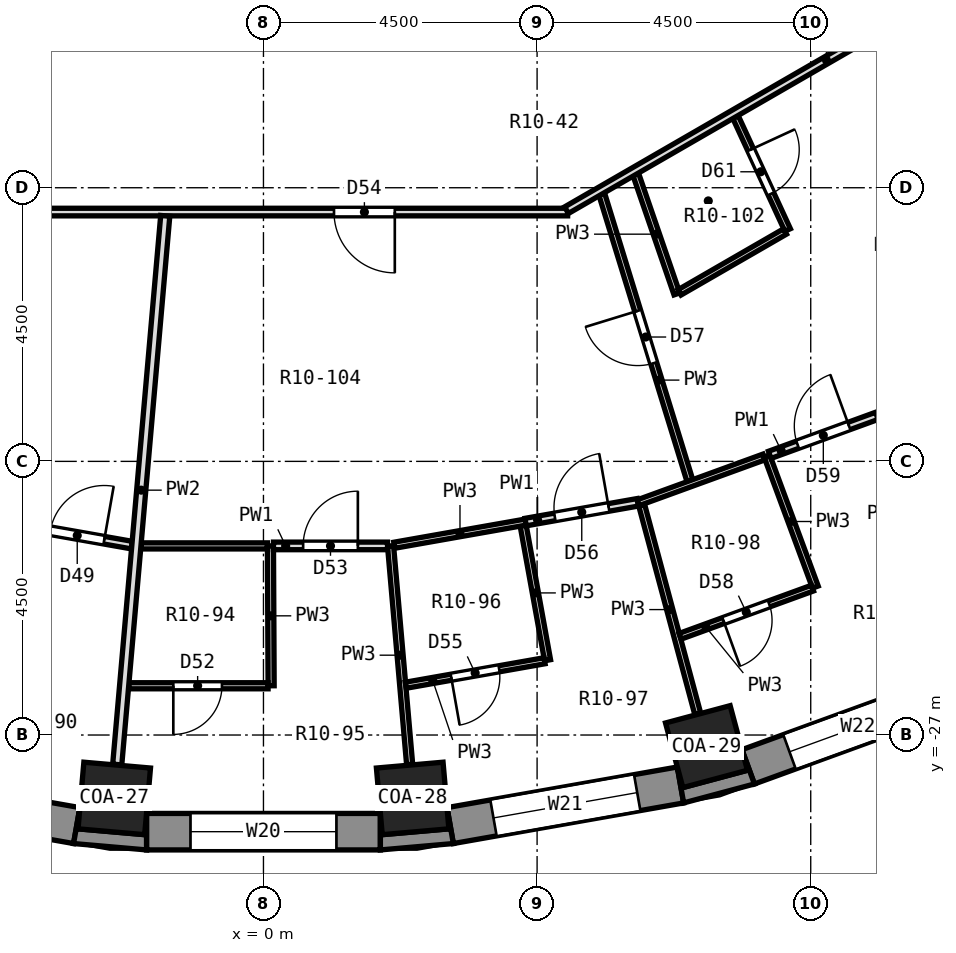
"""IFC4 building model, lengths in metres.
Left out: names, types, materials, properties, quantities, classifications, styles, units other than length and angle.
Written with IfcOpenShell. Run it as: python <this file> out.ifc"""

import sys

from ifc_helpers import new_model, si_unit, direction, frame, frame_2d, origin, origin_2d, place, context, subcontext, project, spatial, polyline, rectangle, outline, extrude, element, fill, save


model = new_model("IFC4")
c1 = context("Model", 3, precision=1e-05, world=origin(), true_north=direction((0.0, 1.0)))
c2 = subcontext(c1, "Body", "Model", "MODEL_VIEW")
j1 = project(units=[si_unit("LENGTHUNIT", "METRE"), si_unit("PLANEANGLEUNIT", "RADIAN")], contexts=[c1])
p1 = place(None, origin())
s1 = spatial("IfcSite", under=j1, at=p1, CompositionType="ELEMENT")
p2 = place(p1, origin())
s2 = spatial("IfcBuilding", under=s1, at=p2, CompositionType="ELEMENT")
p3 = place(p2, frame((0.0, 0.0, 36.2)))
s3 = spatial("IfcBuildingStorey", under=s2, at=p3, CompositionType="ELEMENT", Elevation=36.2)
for number, where, z_axis, x_axis in (
    (1, (-2.453, -28.043, 0.0), (0.0, 0.0, 1.0), (-0.087, -0.996, 0.0)),
    (2, (2.453, -28.043, 0.0), (0.0, 0.0, 1.0), (0.087, -0.996, 0.0)),
    (3, (7.286, -27.191, 0.0), (0.0, 0.0, 1.0), (0.259, -0.966, 0.0)),
):
    element("IfcColumn", number, at=place(p3, frame(where, z_axis=z_axis, x_axis=x_axis)), inside=s3, PredefinedType="COLUMN", context=c2, shape_type="SweptSolid", body=[
        extrude(rectangle(XDim=1.1, YDim=1.1, at=origin_2d()), origin(), (0.0, 0.0, 1.0), 3.3),
    ])
p4 = place(p3, frame((-6.858, -27.821, 0.0), z_axis=(0.0, 0.0, 1.0), x_axis=(0.984800809218, -0.173687553279, 0.0)))
e4 = element("IfcWall", 4, at=p4, inside=s3, PredefinedType="SOLIDWALL", context=c2, shape_type="SweptSolid", body=[
    extrude(rectangle(XDim=3.846, YDim=0.6, at=frame_2d((1.923, 0.0))), origin(), (0.0, 0.0, 1.0), 2.75),
])
p5 = place(p4, frame((0.723, 0.0, 0.9)))
e5 = element("IfcOpeningElement", 5, at=p5, cuts=e4, PredefinedType="OPENING", context=c2, shape_type="SweptSolid", body=[
    extrude(rectangle(XDim=2.4, YDim=1.8, at=frame_2d((1.2, 0.9))), frame((0.0, 0.312, 0.0), z_axis=(0.0, -1.0, 0.0), x_axis=(1.0, 0.0, 0.0)), (0.0, 0.0, 1.0), 0.624),
])
p6 = place(p3, frame((-1.923, -28.59, 0.0), z_axis=(0.0, 0.0, 1.0), x_axis=(1.0, 0.0, 0.0)))
e6 = element("IfcWall", 6, at=p6, inside=s3, PredefinedType="SOLIDWALL", context=c2, shape_type="SweptSolid", body=[
    extrude(rectangle(XDim=3.846, YDim=0.6, at=frame_2d((1.923, 0.0))), origin(), (0.0, 0.0, 1.0), 2.75),
])
p7 = place(p6, frame((0.723, 0.0, 0.9)))
e7 = element("IfcOpeningElement", 7, at=p7, cuts=e6, PredefinedType="OPENING", context=c2, shape_type="SweptSolid", body=[
    extrude(rectangle(XDim=2.4, YDim=1.8, at=frame_2d((1.2, 0.9))), frame((0.0, 0.312, 0.0), z_axis=(0.0, -1.0, 0.0), x_axis=(1.0, 0.0, 0.0)), (0.0, 0.0, 1.0), 0.624),
])
p8 = place(p3, frame((3.071, -28.489, 0.0), z_axis=(0.0, 0.0, 1.0), x_axis=(0.984800809218, 0.173687553279, 0.0)))
e8 = element("IfcWall", 8, at=p8, inside=s3, PredefinedType="SOLIDWALL", context=c2, shape_type="SweptSolid", body=[
    extrude(rectangle(XDim=3.846, YDim=0.6, at=frame_2d((1.923, 0.0))), origin(), (0.0, 0.0, 1.0), 2.75),
])
p9 = place(p8, frame((0.723, 0.0, 0.9)))
e9 = element("IfcOpeningElement", 9, at=p9, cuts=e8, PredefinedType="OPENING", context=c2, shape_type="SweptSolid", body=[
    extrude(rectangle(XDim=2.4, YDim=1.8, at=frame_2d((1.2, 0.9))), frame((0.0, 0.312, 0.0), z_axis=(0.0, -1.0, 0.0), x_axis=(1.0, 0.0, 0.0)), (0.0, 0.0, 1.0), 0.624),
])
p10 = place(p3, frame((7.971, -27.523, 0.0), z_axis=(0.0, 0.0, 1.0), x_axis=(0.939689588564, 0.342028474173, 0.0)))
e10 = element("IfcWall", 10, at=p10, inside=s3, PredefinedType="SOLIDWALL", context=c2, shape_type="SweptSolid", body=[
    extrude(rectangle(XDim=3.846, YDim=0.6, at=frame_2d((1.923, 0.0))), origin(), (0.0, 0.0, 1.0), 2.75),
])
p11 = place(p10, frame((0.723, 0.0, 0.9)))
e11 = element("IfcOpeningElement", 11, at=p11, cuts=e10, PredefinedType="OPENING", context=c2, shape_type="SweptSolid", body=[
    extrude(rectangle(XDim=2.4, YDim=1.8, at=frame_2d((1.2, 0.9))), frame((0.0, 0.312, 0.0), z_axis=(0.0, -1.0, 0.0), x_axis=(1.0, 0.0, 0.0)), (0.0, 0.0, 1.0), 0.624),
])
p12 = place(p3, origin())
e12 = element("IfcWall", 12, at=p12, inside=s3, PredefinedType="SOLIDWALL", context=c2, shape_type="SweptSolid", body=[
    extrude(outline(polyline([(-3.123, -28.785), (-1.923, -28.89), (-1.923, -28.29), (-1.954, -28.639), (-3.049, -28.543), (-3.019, -28.194), (-3.123, -28.785)])), origin(), (0.0, 0.0, 1.0), 2.75),
])
p13 = place(p3, origin())
e13 = element("IfcWall", 13, at=p13, inside=s3, PredefinedType="SOLIDWALL", context=c2, shape_type="SweptSolid", body=[
    extrude(outline(polyline([(1.923, -28.89), (3.123, -28.785), (3.019, -28.194), (3.049, -28.543), (1.954, -28.639), (1.923, -28.29), (1.923, -28.89)])), origin(), (0.0, 0.0, 1.0), 2.75),
])
p14 = place(p3, origin())
e14 = element("IfcWall", 14, at=p14, inside=s3, PredefinedType="SOLIDWALL", context=c2, shape_type="SweptSolid", body=[
    extrude(outline(polyline([(6.91, -28.117), (8.074, -27.805), (7.869, -27.241), (7.959, -27.58), (6.897, -27.865), (6.806, -27.526), (6.91, -28.117)])), origin(), (0.0, 0.0, 1.0), 2.75),
])
p15 = place(p3, frame((0.115, -23.89, 0.0), z_axis=(0.0, 0.0, 1.0), x_axis=(0.004776508509, -0.999988592418, 0.0)))
e15 = element("IfcWall", 15, at=p15, inside=s3, PredefinedType="PARTITIONING", context=c2, shape_type="SweptSolid", body=[
    extrude(rectangle(XDim=2.3, YDim=0.1, at=frame_2d((1.15, 0.0))), origin(), (0.0, 0.0, 1.0), 2.75),
])
p16 = place(p3, frame((2.09, -23.89, 0.0), z_axis=(0.0, 0.0, 1.0), x_axis=(0.08706456859, -0.996202670593, 0.0)))
e16 = element("IfcWall", 16, at=p16, inside=s3, PredefinedType="PARTITIONING", context=c2, shape_type="SweptSolid", body=[
    extrude(rectangle(XDim=3.609, YDim=0.1, at=frame_2d((1.804, 0.0))), origin(), (0.0, 0.0, 1.0), 2.75),
])
p17 = place(p3, frame((4.271, -23.556, 0.0), z_axis=(0.0, 0.0, 1.0), x_axis=(0.178283818946, -0.983979105419, 0.0)))
e17 = element("IfcWall", 17, at=p17, inside=s3, PredefinedType="PARTITIONING", context=c2, shape_type="SweptSolid", body=[
    extrude(rectangle(XDim=2.25, YDim=0.1, at=frame_2d((1.125, 0.0))), origin(), (0.0, 0.0, 1.0), 2.75),
])
p18 = place(p3, frame((6.221, -23.225, 0.0), z_axis=(0.0, 0.0, 1.0), x_axis=(0.259393262225, -0.965771782313, 0.0)))
e18 = element("IfcWall", 18, at=p18, inside=s3, PredefinedType="PARTITIONING", context=c2, shape_type="SweptSolid", body=[
    extrude(rectangle(XDim=3.546, YDim=0.1, at=frame_2d((1.773, 0.0))), origin(), (0.0, 0.0, 1.0), 2.75),
])
p19 = place(p3, frame((5.563, -18.105, 0.0), z_axis=(0.0, 0.0, 1.0), x_axis=(0.293856171107, -0.955849648586, 0.0)))
e19 = element("IfcWall", 19, at=p19, inside=s3, PredefinedType="PARTITIONING", context=c2, shape_type="SweptSolid", body=[
    extrude(rectangle(XDim=4.93, YDim=0.1, at=frame_2d((2.465, 0.0))), origin(), (0.0, 0.0, 1.0), 2.75),
])
p20 = place(p19, frame((2.009, 0.0, 0.0)))
e20 = element("IfcOpeningElement", 20, at=p20, cuts=e19, PredefinedType="OPENING", context=c2, shape_type="SweptSolid", body=[
    extrude(rectangle(XDim=0.9, YDim=2.1, at=frame_2d((0.45, 1.05))), frame((0.0, 0.062, 0.0), z_axis=(0.0, -1.0, 0.0), x_axis=(1.0, 0.0, 0.0)), (0.0, 0.0, 1.0), 0.124),
])
p21 = place(p3, frame((6.123, -17.782, 0.0), z_axis=(0.0, 0.0, 1.0), x_axis=(0.325345833464, -0.945595097622, 0.0)))
e21 = element("IfcWall", 21, at=p21, inside=s3, PredefinedType="PARTITIONING", context=c2, shape_type="SweptSolid", body=[
    extrude(rectangle(XDim=2.077, YDim=0.1, at=frame_2d((1.039, 0.0))), origin(), (0.0, 0.0, 1.0), 2.75),
])
p22 = place(p3, frame((8.279, -22.41, 0.0), z_axis=(0.0, 0.0, 1.0), x_axis=(0.346546571046, -0.938032768136, 0.0)))
e22 = element("IfcWall", 22, at=p22, inside=s3, PredefinedType="PARTITIONING", context=c2, shape_type="SweptSolid", body=[
    extrude(rectangle(XDim=2.3, YDim=0.1, at=frame_2d((1.15, 0.0))), origin(), (0.0, 0.0, 1.0), 2.75),
])
p23 = place(p3, frame((7.763, -16.837, 0.0), z_axis=(0.0, 0.0, 1.0), x_axis=(0.418740408402, -0.908105979702, 0.0)))
e23 = element("IfcWall", 23, at=p23, inside=s3, PredefinedType="PARTITIONING", context=c2, shape_type="SweptSolid", body=[
    extrude(rectangle(XDim=2.046, YDim=0.1, at=frame_2d((1.023, 0.0))), origin(), (0.0, 0.0, 1.0), 2.75),
])
p24 = place(p23, frame((0.592, 0.0, 0.0)))
e24 = element("IfcOpeningElement", 24, at=p24, cuts=e23, PredefinedType="OPENING", context=c2, shape_type="SweptSolid", body=[
    extrude(rectangle(XDim=0.8, YDim=2.1, at=frame_2d((0.4, 1.05))), frame((0.0, 0.062, 0.0), z_axis=(0.0, -1.0, 0.0), x_axis=(1.0, 0.0, 0.0)), (0.0, 0.0, 1.0), 0.124),
])
p25 = place(p3, frame((-3.986, -23.556, 0.0), z_axis=(0.0, 0.0, 1.0), x_axis=(0.984806134001, -0.173657359285, 0.0)))
e25 = element("IfcWall", 25, at=p25, inside=s3, PredefinedType="PARTITIONING", context=c2, shape_type="SweptSolid", body=[
    extrude(rectangle(XDim=1.85, YDim=0.125, at=frame_2d((0.925, 0.0))), origin(), (0.0, 0.0, 1.0), 2.75),
])
p26 = place(p25, frame((0.488, 0.0, 0.0)))
e26 = element("IfcOpeningElement", 26, at=p26, cuts=e25, PredefinedType="OPENING", context=c2, shape_type="SweptSolid", body=[
    extrude(rectangle(XDim=0.9, YDim=2.1, at=frame_2d((0.45, 1.05))), frame((0.0, 0.074, 0.0), z_axis=(0.0, -1.0, 0.0), x_axis=(1.0, 0.0, 0.0)), (0.0, 0.0, 1.0), 0.149),
])
p27 = place(p3, frame((-2.216, -26.19, 0.0), z_axis=(0.0, 0.0, 1.0), x_axis=(1.0, 0.0, 0.0)))
e27 = element("IfcWall", 27, at=p27, inside=s3, PredefinedType="PARTITIONING", context=c2, shape_type="SweptSolid", body=[
    extrude(rectangle(XDim=2.292, YDim=0.1, at=frame_2d((1.146, 0.0))), origin(), (0.0, 0.0, 1.0), 2.75),
])
p28 = place(p27, frame((0.733, 0.0, 0.0)))
e28 = element("IfcOpeningElement", 28, at=p28, cuts=e27, PredefinedType="OPENING", context=c2, shape_type="SweptSolid", body=[
    extrude(rectangle(XDim=0.8, YDim=2.1, at=frame_2d((0.4, 1.05))), frame((0.0, 0.062, 0.0), z_axis=(0.0, -1.0, 0.0), x_axis=(1.0, 0.0, 0.0)), (0.0, 0.0, 1.0), 0.124),
])
p29 = place(p3, frame((-2.015, -23.89, 0.0), z_axis=(0.0, 0.0, 1.0), x_axis=(1.0, 0.0, 0.0)))
e29 = element("IfcWall", 29, at=p29, inside=s3, PredefinedType="PARTITIONING", context=c2, shape_type="SweptSolid", body=[
    extrude(rectangle(XDim=2.08, YDim=0.1, at=frame_2d((1.04, 0.0))), origin(), (0.0, 0.0, 1.0), 2.75),
])
p30 = place(p3, frame((0.165, -23.89, 0.0), z_axis=(0.0, 0.0, 1.0), x_axis=(1.0, 0.0, 0.0)))
e30 = element("IfcWall", 30, at=p30, inside=s3, PredefinedType="PARTITIONING", context=c2, shape_type="SweptSolid", body=[
    extrude(rectangle(XDim=1.875, YDim=0.125, at=frame_2d((0.938, 0.0))), origin(), (0.0, 0.0, 1.0), 2.75),
])
p31 = place(p30, frame((0.488, 0.0, 0.0)))
e31 = element("IfcOpeningElement", 31, at=p31, cuts=e30, PredefinedType="OPENING", context=c2, shape_type="SweptSolid", body=[
    extrude(rectangle(XDim=0.9, YDim=2.1, at=frame_2d((0.45, 1.05))), frame((0.0, 0.074, 0.0), z_axis=(0.0, -1.0, 0.0), x_axis=(1.0, 0.0, 0.0)), (0.0, 0.0, 1.0), 0.149),
])
p32 = place(p3, frame((-4.867, -18.4, 0.0), z_axis=(0.0, 0.0, 1.0), x_axis=(1.0, 0.0, 0.0)))
e32 = element("IfcWall", 32, at=p32, inside=s3, PredefinedType="PARTITIONING", context=c2, shape_type="SweptSolid", body=[
    extrude(rectangle(XDim=9.87, YDim=0.125, at=frame_2d((4.935, 0.0))), origin(), (0.0, 0.0, 1.0), 2.75),
])
p33 = place(p32, frame((6.028, 0.0, 0.0)))
e33 = element("IfcOpeningElement", 33, at=p33, cuts=e32, PredefinedType="OPENING", context=c2, shape_type="SweptSolid", body=[
    extrude(rectangle(XDim=1.0, YDim=2.1, at=frame_2d((0.5, 1.05))), frame((0.0, 0.074, 0.0), z_axis=(0.0, -1.0, 0.0), x_axis=(1.0, 0.0, 0.0)), (0.0, 0.0, 1.0), 0.149),
])
p34 = place(p3, frame((2.341, -26.181, 0.0), z_axis=(0.0, 0.0, 1.0), x_axis=(0.984795222678, 0.173719225738, 0.0)))
e34 = element("IfcWall", 34, at=p34, inside=s3, PredefinedType="PARTITIONING", context=c2, shape_type="SweptSolid", body=[
    extrude(rectangle(XDim=2.317, YDim=0.1, at=frame_2d((1.159, 0.0))), origin(), (0.0, 0.0, 1.0), 2.75),
])
p35 = place(p34, frame((0.759, 0.0, 0.0)))
e35 = element("IfcOpeningElement", 35, at=p35, cuts=e34, PredefinedType="OPENING", context=c2, shape_type="SweptSolid", body=[
    extrude(rectangle(XDim=0.8, YDim=2.1, at=frame_2d((0.4, 1.05))), frame((0.0, 0.062, 0.0), z_axis=(0.0, -1.0, 0.0), x_axis=(1.0, 0.0, 0.0)), (0.0, 0.0, 1.0), 0.124),
])
p36 = place(p3, frame((2.152, -23.879, 0.0), z_axis=(0.0, 0.0, 1.0), x_axis=(0.984803725636, 0.173671016504, 0.0)))
e36 = element("IfcWall", 36, at=p36, inside=s3, PredefinedType="PARTITIONING", context=c2, shape_type="SweptSolid", body=[
    extrude(rectangle(XDim=2.193, YDim=0.1, at=frame_2d((1.097, 0.0))), origin(), (0.0, 0.0, 1.0), 2.75),
])
p37 = place(p3, frame((4.311, -23.498, 0.0), z_axis=(0.0, 0.0, 1.0), x_axis=(0.984797974945, 0.173703622713, 0.0)))
e37 = element("IfcWall", 37, at=p37, inside=s3, PredefinedType="PARTITIONING", context=c2, shape_type="SweptSolid", body=[
    extrude(rectangle(XDim=1.875, YDim=0.125, at=frame_2d((0.938, 0.0))), origin(), (0.0, 0.0, 1.0), 2.75),
])
p38 = place(p37, frame((0.488, 0.0, 0.0)))
e38 = element("IfcOpeningElement", 38, at=p38, cuts=e37, PredefinedType="OPENING", context=c2, shape_type="SweptSolid", body=[
    extrude(rectangle(XDim=0.9, YDim=2.1, at=frame_2d((0.45, 1.05))), frame((0.0, 0.074, 0.0), z_axis=(0.0, -1.0, 0.0), x_axis=(1.0, 0.0, 0.0)), (0.0, 0.0, 1.0), 0.149),
])
p39 = place(p3, frame((6.851, -25.377, 0.0), z_axis=(0.0, 0.0, 1.0), x_axis=(0.939679567759, 0.342056004093, 0.0)))
e39 = element("IfcWall", 39, at=p39, inside=s3, PredefinedType="PARTITIONING", context=c2, shape_type="SweptSolid", body=[
    extrude(rectangle(XDim=2.318, YDim=0.1, at=frame_2d((1.159, 0.0))), origin(), (0.0, 0.0, 1.0), 2.75),
])
p40 = place(p39, frame((0.758, 0.0, 0.0)))
e40 = element("IfcOpeningElement", 40, at=p40, cuts=e39, PredefinedType="OPENING", context=c2, shape_type="SweptSolid", body=[
    extrude(rectangle(XDim=0.8, YDim=2.1, at=frame_2d((0.4, 1.05))), frame((0.0, 0.062, 0.0), z_axis=(0.0, -1.0, 0.0), x_axis=(1.0, 0.0, 0.0)), (0.0, 0.0, 1.0), 0.124),
])
p41 = place(p3, frame((6.159, -23.181, 0.0), z_axis=(0.0, 0.0, 1.0), x_axis=(0.939696437289, 0.342009657388, 0.0)))
e41 = element("IfcWall", 41, at=p41, inside=s3, PredefinedType="PARTITIONING", context=c2, shape_type="SweptSolid", body=[
    extrude(rectangle(XDim=2.206, YDim=0.1, at=frame_2d((1.103, 0.0))), origin(), (0.0, 0.0, 1.0), 2.75),
])
p42 = place(p3, frame((8.326, -22.393, 0.0), z_axis=(0.0, 0.0, 1.0), x_axis=(0.939656514106, 0.342119329325, 0.0)))
e42 = element("IfcWall", 42, at=p42, inside=s3, PredefinedType="PARTITIONING", context=c2, shape_type="SweptSolid", body=[
    extrude(rectangle(XDim=1.875, YDim=0.125, at=frame_2d((0.938, 0.0))), origin(), (0.0, 0.0, 1.0), 2.75),
])
p43 = place(p42, frame((0.488, 0.0, 0.0)))
e43 = element("IfcOpeningElement", 43, at=p43, cuts=e42, PredefinedType="OPENING", context=c2, shape_type="SweptSolid", body=[
    extrude(rectangle(XDim=0.9, YDim=2.1, at=frame_2d((0.45, 1.05))), frame((0.0, 0.074, 0.0), z_axis=(0.0, -1.0, 0.0), x_axis=(1.0, 0.0, 0.0)), (0.0, 0.0, 1.0), 0.149),
])
p44 = place(p3, frame((6.842, -19.721, 0.0), z_axis=(0.0, 0.0, 1.0), x_axis=(0.866104386261, 0.499863173377, 0.0)))
e44 = element("IfcWall", 44, at=p44, inside=s3, PredefinedType="PARTITIONING", context=c2, shape_type="SweptSolid", body=[
    extrude(rectangle(XDim=2.002, YDim=0.1, at=frame_2d((1.001, 0.0))), origin(), (0.0, 0.0, 1.0), 2.75),
])
p45 = place(p3, frame((4.984, -18.369, 0.0), z_axis=(0.0, 0.0, 1.0), x_axis=(0.86605048973, 0.49995654735, 0.0)))
e45 = element("IfcWall", 45, at=p45, inside=s3, PredefinedType="PARTITIONING", context=c2, shape_type="SweptSolid", body=[
    extrude(rectangle(XDim=9.871, YDim=0.125, at=frame_2d((4.935, 0.0))), origin(), (0.0, 0.0, 1.0), 2.75),
])
p46 = place(p45, frame((7.174, 0.0, 0.0)))
e46 = element("IfcOpeningElement", 46, at=p46, cuts=e45, PredefinedType="OPENING", context=c2, shape_type="SweptSolid", body=[
    extrude(rectangle(XDim=1.0, YDim=2.1, at=frame_2d((0.5, 1.05))), frame((0.0, 0.074, 0.0), z_axis=(0.0, -1.0, 0.0), x_axis=(1.0, 0.0, 0.0)), (0.0, 0.0, 1.0), 0.149),
])
p47 = place(p3, frame((-2.405, -27.485, 0.0), z_axis=(0.0, 0.0, 1.0), x_axis=(0.087173972326, 0.996193103042, 0.0)))
e47 = element("IfcWall", 47, at=p47, inside=s3, PredefinedType="PARTITIONING", context=c2, shape_type="SweptSolid", body=[
    extrude(rectangle(XDim=9.057, YDim=0.15, at=frame_2d((4.529, 0.0))), origin(), (0.0, 0.0, 1.0), 2.75),
])
p48 = place(p7, origin())
e48 = element("IfcWindow", 48, at=p48, inside=s3, PartitioningType="SINGLE_PANEL", PredefinedType="WINDOW", context=c2, shape_type="SweptSolid", body=[
    extrude(rectangle(XDim=2.4, YDim=1.8, at=frame_2d((1.2, 0.9))), frame((0.0, 0.18, 0.0), z_axis=(0.0, -1.0, 0.0), x_axis=(1.0, 0.0, 0.0)), (0.0, 0.0, 1.0), 0.06),
])
fill(e7, e48)
p49 = place(p9, origin())
e49 = element("IfcWindow", 49, at=p49, inside=s3, PartitioningType="SINGLE_PANEL", PredefinedType="WINDOW", context=c2, shape_type="SweptSolid", body=[
    extrude(rectangle(XDim=2.4, YDim=1.8, at=frame_2d((1.2, 0.9))), frame((0.0, 0.18, 0.0), z_axis=(0.0, -1.0, 0.0), x_axis=(1.0, 0.0, 0.0)), (0.0, 0.0, 1.0), 0.06),
])
fill(e9, e49)
p50 = place(p11, origin())
e50 = element("IfcWindow", 50, at=p50, inside=s3, PartitioningType="SINGLE_PANEL", PredefinedType="WINDOW", context=c2, shape_type="SweptSolid", body=[
    extrude(rectangle(XDim=2.4, YDim=1.8, at=frame_2d((1.2, 0.9))), frame((0.0, 0.18, 0.0), z_axis=(0.0, -1.0, 0.0), x_axis=(1.0, 0.0, 0.0)), (0.0, 0.0, 1.0), 0.06),
])
fill(e11, e50)
p51 = place(p26, origin())
e51 = element("IfcDoor", 51, at=p51, inside=s3, OperationType="SINGLE_SWING_RIGHT", PredefinedType="DOOR", context=c2, shape_type="SweptSolid", body=[
    extrude(rectangle(XDim=0.9, YDim=2.1, at=frame_2d((0.45, 1.05))), frame((0.0, 0.025, 0.0), z_axis=(0.0, -1.0, 0.0), x_axis=(1.0, 0.0, 0.0)), (0.0, 0.0, 1.0), 0.05),
])
fill(e26, e51)
p52 = place(p28, frame((0.8, 0.0, 0.0), z_axis=(0.0, 0.0, 1.0), x_axis=(-1.0, 0.0, 0.0)))
e52 = element("IfcDoor", 52, at=p52, inside=s3, OperationType="SINGLE_SWING_RIGHT", PredefinedType="DOOR", context=c2, shape_type="SweptSolid", body=[
    extrude(rectangle(XDim=0.8, YDim=2.1, at=frame_2d((0.4, 1.05))), frame((0.0, 0.025, 0.0), z_axis=(0.0, -1.0, 0.0), x_axis=(1.0, 0.0, 0.0)), (0.0, 0.0, 1.0), 0.05),
])
fill(e28, e52)
p53 = place(p31, origin())
e53 = element("IfcDoor", 53, at=p53, inside=s3, OperationType="SINGLE_SWING_RIGHT", PredefinedType="DOOR", context=c2, shape_type="SweptSolid", body=[
    extrude(rectangle(XDim=0.9, YDim=2.1, at=frame_2d((0.45, 1.05))), frame((0.0, 0.025, 0.0), z_axis=(0.0, -1.0, 0.0), x_axis=(1.0, 0.0, 0.0)), (0.0, 0.0, 1.0), 0.05),
])
fill(e31, e53)
p54 = place(p33, frame((1.0, 0.0, 0.0), z_axis=(0.0, 0.0, 1.0), x_axis=(-1.0, 0.0, 0.0)))
e54 = element("IfcDoor", 54, at=p54, inside=s3, OperationType="SINGLE_SWING_LEFT", PredefinedType="DOOR", context=c2, shape_type="SweptSolid", body=[
    extrude(rectangle(XDim=1.0, YDim=2.1, at=frame_2d((0.5, 1.05))), frame((0.0, 0.025, 0.0), z_axis=(0.0, -1.0, 0.0), x_axis=(1.0, 0.0, 0.0)), (0.0, 0.0, 1.0), 0.05),
])
fill(e33, e54)
p55 = place(p35, frame((0.8, 0.0, 0.0), z_axis=(0.0, 0.0, 1.0), x_axis=(-1.0, 0.0, 0.0)))
e55 = element("IfcDoor", 55, at=p55, inside=s3, OperationType="SINGLE_SWING_RIGHT", PredefinedType="DOOR", context=c2, shape_type="SweptSolid", body=[
    extrude(rectangle(XDim=0.8, YDim=2.1, at=frame_2d((0.4, 1.05))), frame((0.0, 0.025, 0.0), z_axis=(0.0, -1.0, 0.0), x_axis=(1.0, 0.0, 0.0)), (0.0, 0.0, 1.0), 0.05),
])
fill(e35, e55)
p56 = place(p38, origin())
e56 = element("IfcDoor", 56, at=p56, inside=s3, OperationType="SINGLE_SWING_RIGHT", PredefinedType="DOOR", context=c2, shape_type="SweptSolid", body=[
    extrude(rectangle(XDim=0.9, YDim=2.1, at=frame_2d((0.45, 1.05))), frame((0.0, 0.025, 0.0), z_axis=(0.0, -1.0, 0.0), x_axis=(1.0, 0.0, 0.0)), (0.0, 0.0, 1.0), 0.05),
])
fill(e38, e56)
p57 = place(p20, frame((0.9, 0.0, 0.0), z_axis=(0.0, 0.0, 1.0), x_axis=(-1.0, 0.0, 0.0)))
e57 = element("IfcDoor", 57, at=p57, inside=s3, OperationType="SINGLE_SWING_RIGHT", PredefinedType="DOOR", context=c2, shape_type="SweptSolid", body=[
    extrude(rectangle(XDim=0.9, YDim=2.1, at=frame_2d((0.45, 1.05))), frame((0.0, 0.025, 0.0), z_axis=(0.0, -1.0, 0.0), x_axis=(1.0, 0.0, 0.0)), (0.0, 0.0, 1.0), 0.05),
])
fill(e20, e57)
p58 = place(p40, frame((0.8, 0.0, 0.0), z_axis=(0.0, 0.0, 1.0), x_axis=(-1.0, 0.0, 0.0)))
e58 = element("IfcDoor", 58, at=p58, inside=s3, OperationType="SINGLE_SWING_RIGHT", PredefinedType="DOOR", context=c2, shape_type="SweptSolid", body=[
    extrude(rectangle(XDim=0.8, YDim=2.1, at=frame_2d((0.4, 1.05))), frame((0.0, 0.025, 0.0), z_axis=(0.0, -1.0, 0.0), x_axis=(1.0, 0.0, 0.0)), (0.0, 0.0, 1.0), 0.05),
])
fill(e40, e58)
p59 = place(p43, origin())
e59 = element("IfcDoor", 59, at=p59, inside=s3, OperationType="SINGLE_SWING_RIGHT", PredefinedType="DOOR", context=c2, shape_type="SweptSolid", body=[
    extrude(rectangle(XDim=0.9, YDim=2.1, at=frame_2d((0.45, 1.05))), frame((0.0, 0.025, 0.0), z_axis=(0.0, -1.0, 0.0), x_axis=(1.0, 0.0, 0.0)), (0.0, 0.0, 1.0), 0.05),
])
fill(e43, e59)
p60 = place(p24, origin())
e60 = element("IfcDoor", 60, at=p60, inside=s3, OperationType="SINGLE_SWING_LEFT", PredefinedType="DOOR", context=c2, shape_type="SweptSolid", body=[
    extrude(rectangle(XDim=0.8, YDim=2.1, at=frame_2d((0.4, 1.05))), frame((0.0, 0.025, 0.0), z_axis=(0.0, -1.0, 0.0), x_axis=(1.0, 0.0, 0.0)), (0.0, 0.0, 1.0), 0.05),
])
fill(e24, e60)
save(model, sys.argv[1])
